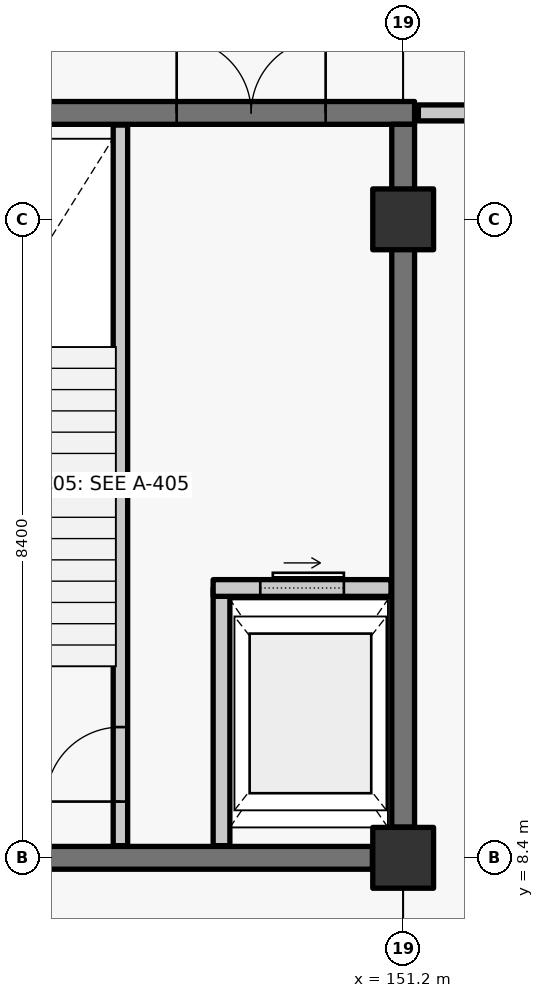
"""IFC4 building model, lengths in metres.
Left out: names, types, materials, properties, quantities, classifications, styles, units other than length and angle.
Written with IfcOpenShell. Run it as: python <this file> out.ifc"""

import sys

from ifc_helpers import new_model, si_unit, direction, frame, frame_2d, origin, origin_2d, place, context, subcontext, project, spatial, rectangle, extrude, element, fill, save


model = new_model("IFC4")
c1 = context("Model", 3, precision=1e-05, world=origin(), true_north=direction((0.0, 1.0)))
c2 = subcontext(c1, "Body", "Model", "MODEL_VIEW")
j1 = project(units=[si_unit("LENGTHUNIT", "METRE"), si_unit("PLANEANGLEUNIT", "RADIAN")], contexts=[c1])
p1 = place(None, origin())
s1 = spatial("IfcSite", under=j1, at=p1, CompositionType="ELEMENT")
p2 = place(p1, origin())
s2 = spatial("IfcBuilding", under=s1, at=p2, CompositionType="ELEMENT")
p3 = place(p2, frame((0.0, 0.0, 6.0)))
s3 = spatial("IfcBuildingStorey", under=s2, at=p3, CompositionType="ELEMENT", Elevation=6.0)
for number, where, z_axis, x_axis in (
    (1, (151.2, 8.4, 0.0), (0.0, 0.0, 1.0), (1.0, 0.0, 0.0)),
    (2, (151.2, 16.8, 0.0), (0.0, 0.0, 1.0), (1.0, 0.0, 0.0)),
):
    element("IfcColumn", number, at=place(p3, frame(where, z_axis=z_axis, x_axis=x_axis)), inside=s3, PredefinedType="COLUMN", context=c2, shape_type="SweptSolid", body=[
        extrude(rectangle(XDim=0.8, YDim=0.8, at=origin_2d()), origin(), (0.0, 0.0, 1.0), 5.4),
    ])
p4 = place(p3, frame((150.795, 8.4, 0.0), z_axis=(0.0, 0.0, 1.0), x_axis=(-1.0, 0.0, 0.0)))
e3 = element("IfcWall", 3, at=p4, inside=s3, PredefinedType="SHEAR", context=c2, shape_type="SweptSolid", body=[
    extrude(rectangle(XDim=7.59, YDim=0.3, at=frame_2d((3.795, 0.0))), origin(), (0.0, 0.0, 1.0), 5.12),
])
p5 = place(p3, frame((142.65, 18.2, 0.0), z_axis=(0.0, 0.0, 1.0), x_axis=(1.0, 0.0, 0.0)))
e4 = element("IfcWall", 4, at=p5, inside=s3, PredefinedType="SHEAR", context=c2, shape_type="SweptSolid", body=[
    extrude(rectangle(XDim=8.7, YDim=0.3, at=frame_2d((4.35, 0.0))), origin(), (0.0, 0.0, 1.0), 5.12),
])
p6 = place(p5, frame((5.57, 0.0, 0.0)))
e5 = element("IfcOpeningElement", 5, at=p6, cuts=e4, PredefinedType="OPENING", context=c2, shape_type="SweptSolid", body=[
    extrude(rectangle(XDim=1.96, YDim=2.2, at=frame_2d((0.98, 1.1))), frame((0.0, 0.16, 0.0), z_axis=(0.0, -1.0, 0.0), x_axis=(1.0, 0.0, 0.0)), (0.0, 0.0, 1.0), 0.32),
])
p7 = place(p3, frame((151.2, 18.05, 0.0), z_axis=(0.0, 0.0, 1.0), x_axis=(0.0, -1.0, 0.0)))
e6 = element("IfcWall", 6, at=p7, inside=s3, PredefinedType="SHEAR", context=c2, shape_type="SweptSolid", body=[
    extrude(rectangle(XDim=9.245, YDim=0.3, at=frame_2d((4.623, 0.0))), origin(), (0.0, 0.0, 1.0), 5.12),
])
p8 = place(p3, frame((147.48, 8.56, 0.0), z_axis=(0.0, 0.0, 1.0), x_axis=(0.0, 1.0, 0.0)))
e7 = element("IfcWall", 7, at=p8, inside=s3, PredefinedType="SOLIDWALL", context=c2, shape_type="SweptSolid", body=[
    extrude(rectangle(XDim=9.48, YDim=0.19, at=frame_2d((4.74, 0.0))), origin(), (0.0, 0.0, 1.0), 5.12),
])
p9 = place(p8, frame((0.58, 0.0, 0.0)))
e8 = element("IfcOpeningElement", 8, at=p9, cuts=e7, PredefinedType="OPENING", context=c2, shape_type="SweptSolid", body=[
    extrude(rectangle(XDim=0.98, YDim=2.15, at=frame_2d((0.49, 1.075))), frame((0.0, 0.105, 0.0), z_axis=(0.0, -1.0, 0.0), x_axis=(1.0, 0.0, 0.0)), (0.0, 0.0, 1.0), 0.21),
])
p10 = place(p3, frame((148.81, 8.56, 0.0), z_axis=(0.0, 0.0, 1.0), x_axis=(0.0, 1.0, 0.0)))
e9 = element("IfcWall", 9, at=p10, inside=s3, PredefinedType="SOLIDWALL", context=c2, shape_type="SweptSolid", body=[
    extrude(rectangle(XDim=3.39, YDim=0.22, at=frame_2d((1.695, 0.0))), origin(), (0.0, 0.0, 1.0), 5.12),
])
p11 = place(p3, frame((148.7, 11.95, 0.0), z_axis=(0.0, 0.0, 1.0), x_axis=(1.0, 0.0, 0.0)))
e10 = element("IfcWall", 10, at=p11, inside=s3, PredefinedType="SOLIDWALL", context=c2, shape_type="SweptSolid", body=[
    extrude(rectangle(XDim=2.34, YDim=0.22, at=frame_2d((1.17, 0.0))), origin(), (0.0, 0.0, 1.0), 5.12),
])
p12 = place(p11, frame((0.62, 0.0, 0.0)))
e11 = element("IfcOpeningElement", 11, at=p12, cuts=e10, PredefinedType="OPENING", context=c2, shape_type="SweptSolid", body=[
    extrude(rectangle(XDim=1.1, YDim=2.2, at=frame_2d((0.55, 1.1))), frame((0.0, 0.12, 0.0), z_axis=(0.0, -1.0, 0.0), x_axis=(1.0, 0.0, 0.0)), (0.0, 0.0, 1.0), 0.24),
])
p13 = place(p3, frame((151.4, 18.2, 0.0), z_axis=(0.0, 0.0, 1.0), x_axis=(1.0, 0.0, 0.0)))
e12 = element("IfcWall", 12, at=p13, inside=s3, PredefinedType="PARTITIONING", context=c2, shape_type="SweptSolid", body=[
    extrude(rectangle(XDim=33.2, YDim=0.21, at=frame_2d((16.6, 0.0))), origin(), (0.0, 0.0, 1.0), 5.12),
])
p14 = place(p13, frame((3.5, 0.0, 0.0)))
e13 = element("IfcOpeningElement", 13, at=p14, cuts=e12, PredefinedType="OPENING", context=c2, shape_type="SweptSolid", body=[
    extrude(rectangle(XDim=1.0, YDim=2.15, at=frame_2d((0.5, 1.075))), frame((0.0, 0.115, 0.0), z_axis=(0.0, -1.0, 0.0), x_axis=(1.0, 0.0, 0.0)), (0.0, 0.0, 1.0), 0.23),
])
p15 = place(p13, frame((28.7, 0.0, 0.0)))
e14 = element("IfcOpeningElement", 14, at=p15, cuts=e12, PredefinedType="OPENING", context=c2, shape_type="SweptSolid", body=[
    extrude(rectangle(XDim=1.0, YDim=2.15, at=frame_2d((0.5, 1.075))), frame((0.0, 0.115, 0.0), z_axis=(0.0, -1.0, 0.0), x_axis=(1.0, 0.0, 0.0)), (0.0, 0.0, 1.0), 0.23),
])
p16 = place(p9, origin())
e15 = element("IfcDoor", 15, at=p16, inside=s3, OperationType="SINGLE_SWING_LEFT", PredefinedType="DOOR", context=c2, shape_type="SweptSolid", body=[
    extrude(rectangle(XDim=0.98, YDim=2.15, at=frame_2d((0.49, 1.075))), frame((0.0, 0.025, 0.0), z_axis=(0.0, -1.0, 0.0), x_axis=(1.0, 0.0, 0.0)), (0.0, 0.0, 1.0), 0.05),
])
fill(e8, e15)
p17 = place(p6, origin())
e16 = element("IfcDoor", 16, at=p17, inside=s3, OperationType="DOUBLE_DOOR_SINGLE_SWING", PredefinedType="DOOR", context=c2, shape_type="SweptSolid", body=[
    extrude(rectangle(XDim=1.96, YDim=2.2, at=frame_2d((0.98, 1.1))), frame((0.0, 0.025, 0.0), z_axis=(0.0, -1.0, 0.0), x_axis=(1.0, 0.0, 0.0)), (0.0, 0.0, 1.0), 0.05),
])
fill(e5, e16)
p18 = place(p12, origin())
e17 = element("IfcDoor", 17, at=p18, inside=s3, OperationType="SLIDING_TO_RIGHT", PredefinedType="DOOR", context=c2, shape_type="SweptSolid", body=[
    extrude(rectangle(XDim=1.1, YDim=2.2, at=frame_2d((0.55, 1.1))), frame((0.0, 0.025, 0.0), z_axis=(0.0, -1.0, 0.0), x_axis=(1.0, 0.0, 0.0)), (0.0, 0.0, 1.0), 0.05),
])
fill(e11, e17)
save(model, sys.argv[1])
